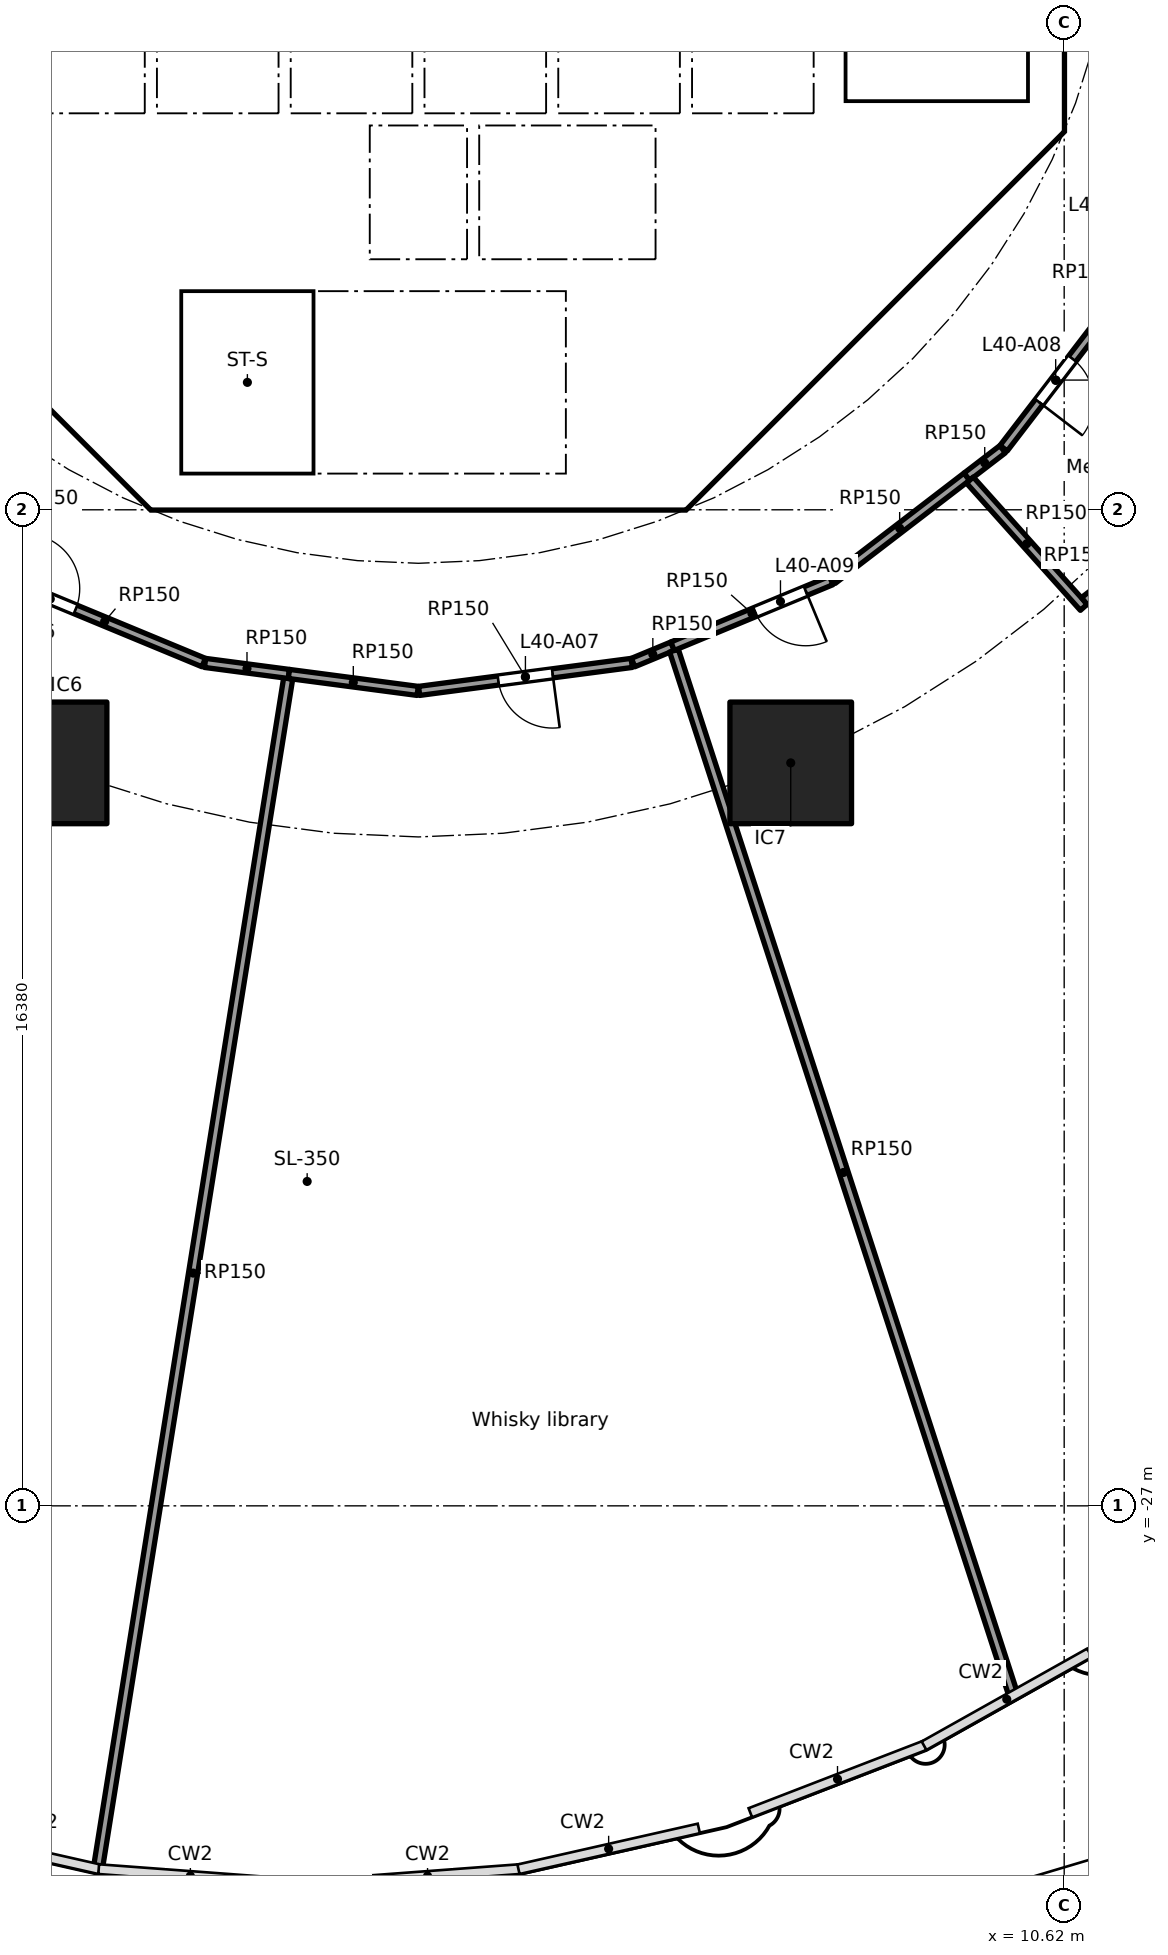
"""IFC4 building model, lengths in metres.
Left out: names, types, materials, properties, quantities, classifications, styles, units other than length and angle.
Written with IfcOpenShell. Run it as: python <this file> out.ifc"""

import sys

from ifc_helpers import new_model, si_unit, direction, frame, frame_2d, origin, origin_2d, place, context, subcontext, project, spatial, polyline, rectangle, outline, extrude, element, fill, save


model = new_model("IFC4")
c1 = context("Model", 3, precision=1e-05, world=origin(), true_north=direction((0.0, 1.0)))
c2 = subcontext(c1, "Body", "Model", "MODEL_VIEW")
j1 = project(units=[si_unit("LENGTHUNIT", "METRE"), si_unit("PLANEANGLEUNIT", "RADIAN")], contexts=[c1])
p1 = place(None, origin())
s1 = spatial("IfcSite", under=j1, at=p1, CompositionType="ELEMENT")
p2 = place(p1, origin())
s2 = spatial("IfcBuilding", under=s1, at=p2, CompositionType="ELEMENT")
p3 = place(p2, frame((0.0, 0.0, 160.3)))
s3 = spatial("IfcBuildingStorey", under=s2, at=p3, CompositionType="ELEMENT", Elevation=160.3)
for number, where, z_axis, x_axis in (
    (1, (-6.123, -14.782, 0.0), (0.0, 0.0, 1.0), (1.0, 0.0, 0.0)),
    (2, (6.123, -14.782, 0.0), (0.0, 0.0, 1.0), (1.0, 0.0, 0.0)),
):
    element("IfcColumn", number, at=place(p3, frame(where, z_axis=z_axis, x_axis=x_axis)), inside=s3, PredefinedType="COLUMN", context=c2, shape_type="SweptSolid", body=[
        extrude(rectangle(XDim=2.0, YDim=2.0, at=origin_2d()), origin(), (0.0, 0.0, 1.0), 5.6),
    ])
p4 = place(p3, frame((-9.988, -4.613, 0.0), z_axis=(0.0, 0.0, 1.0), x_axis=(0.707106781187, -0.707106781187, 0.0)))
e3 = element("IfcWall", 3, at=p4, inside=s3, PredefinedType="SHEAR", context=c2, shape_type="SweptSolid", body=[
    extrude(rectangle(XDim=7.602, YDim=0.6, at=frame_2d((3.801, 0.0))), origin(), (0.0, 0.0, 1.0), 5.34),
])
p5 = place(p4, frame((6.151, 0.0, 0.0)))
e4 = element("IfcOpeningElement", 4, at=p5, cuts=e3, PredefinedType="OPENING", context=c2, shape_type="SweptSolid", body=[
    extrude(rectangle(XDim=1.1, YDim=2.1, at=frame_2d((0.55, 1.05))), frame((0.0, 0.31, 0.0), z_axis=(0.0, -1.0, 0.0), x_axis=(1.0, 0.0, 0.0)), (0.0, 0.0, 1.0), 0.62),
])
p6 = place(p3, frame((4.613, -9.988, 0.0), z_axis=(0.0, 0.0, 1.0), x_axis=(0.707106781187, 0.707106781187, 0.0)))
e5 = element("IfcWall", 5, at=p6, inside=s3, PredefinedType="SHEAR", context=c2, shape_type="SweptSolid", body=[
    extrude(rectangle(XDim=7.602, YDim=0.6, at=frame_2d((3.801, 0.0))), origin(), (0.0, 0.0, 1.0), 5.34),
])
p7 = place(p6, frame((3.201, 0.0, 0.0)))
e6 = element("IfcOpeningElement", 6, at=p7, cuts=e5, PredefinedType="OPENING", context=c2, shape_type="SweptSolid", body=[
    extrude(rectangle(XDim=1.2, YDim=2.1, at=frame_2d((0.6, 1.05))), frame((0.0, 0.31, 0.0), z_axis=(0.0, -1.0, 0.0), x_axis=(1.0, 0.0, 0.0)), (0.0, 0.0, 1.0), 0.62),
])
p8 = place(p3, frame((4.0, -10.025, 0.0), z_axis=(0.0, 0.0, 1.0), x_axis=(0.0, 1.0, 0.0)))
e7 = element("IfcWall", 7, at=p8, inside=s3, PredefinedType="SOLIDWALL", context=c2, shape_type="SweptSolid", body=[
    extrude(rectangle(XDim=3.0, YDim=0.2, at=frame_2d((1.5, 0.0))), origin(), (0.0, 0.0, 1.0), 5.34),
])
p9 = place(p8, frame((0.975, 0.0, 0.0)))
e8 = element("IfcOpeningElement", 8, at=p9, cuts=e7, PredefinedType="OPENING", context=c2, shape_type="SweptSolid", body=[
    extrude(rectangle(XDim=1.1, YDim=2.1, at=frame_2d((0.55, 1.05))), frame((0.0, 0.11, 0.0), z_axis=(0.0, -1.0, 0.0), x_axis=(1.0, 0.0, 0.0)), (0.0, 0.0, 1.0), 0.22),
])
p10 = place(p3, frame((-5.8, -8.227, 0.0), z_axis=(0.0, 0.0, 1.0), x_axis=(0.0, 1.0, 0.0)))
e9 = element("IfcWall", 9, at=p10, inside=s3, PredefinedType="PARTITIONING", context=c2, shape_type="SweptSolid", body=[
    extrude(rectangle(XDim=3.927, YDim=0.15, at=frame_2d((1.963, 0.0))), origin(), (0.0, 0.0, 1.0), 5.34),
])
p11 = place(p10, frame((2.764, 0.0, 0.0)))
e10 = element("IfcOpeningElement", 10, at=p11, cuts=e9, PredefinedType="OPENING", context=c2, shape_type="SweptSolid", body=[
    extrude(rectangle(XDim=0.9, YDim=2.1, at=frame_2d((0.45, 1.05))), frame((0.0, 0.085, 0.0), z_axis=(0.0, -1.0, 0.0), x_axis=(1.0, 0.0, 0.0)), (0.0, 0.0, 1.0), 0.17),
])
p12 = place(p10, frame((0.688, 0.0, 0.0)))
e11 = element("IfcOpeningElement", 11, at=p12, cuts=e9, PredefinedType="OPENING", context=c2, shape_type="SweptSolid", body=[
    extrude(rectangle(XDim=0.9, YDim=2.1, at=frame_2d((0.45, 1.05))), frame((0.0, 0.085, 0.0), z_axis=(0.0, -1.0, 0.0), x_axis=(1.0, 0.0, 0.0)), (0.0, 0.0, 1.0), 0.17),
])
p13 = place(p3, frame((4.0, -6.5, 0.0), z_axis=(0.0, 0.0, 1.0), x_axis=(0.0, 1.0, 0.0)))
e12 = element("IfcWall", 12, at=p13, inside=s3, PredefinedType="SOLIDWALL", context=c2, shape_type="SweptSolid", body=[
    extrude(rectangle(XDim=2.2, YDim=0.2, at=frame_2d((1.1, 0.0))), origin(), (0.0, 0.0, 1.0), 5.34),
])
p14 = place(p13, frame((0.55, 0.0, 0.0)))
e13 = element("IfcOpeningElement", 13, at=p14, cuts=e12, PredefinedType="OPENING", context=c2, shape_type="SweptSolid", body=[
    extrude(rectangle(XDim=1.1, YDim=2.1, at=frame_2d((0.55, 1.05))), frame((0.0, 0.11, 0.0), z_axis=(0.0, -1.0, 0.0), x_axis=(1.0, 0.0, 0.0)), (0.0, 0.0, 1.0), 0.22),
])
p15 = place(p3, frame((-4.0, -6.5, 0.0), z_axis=(0.0, 0.0, 1.0), x_axis=(0.0, 1.0, 0.0)))
e14 = element("IfcWall", 14, at=p15, inside=s3, PredefinedType="SOLIDWALL", context=c2, shape_type="SweptSolid", body=[
    extrude(rectangle(XDim=2.2, YDim=0.2, at=frame_2d((1.1, 0.0))), origin(), (0.0, 0.0, 1.0), 5.34),
])
p16 = place(p15, frame((0.65, 0.0, 0.0)))
e15 = element("IfcOpeningElement", 15, at=p16, cuts=e14, PredefinedType="OPENING", context=c2, shape_type="SweptSolid", body=[
    extrude(rectangle(XDim=0.9, YDim=2.1, at=frame_2d((0.45, 1.05))), frame((0.0, 0.11, 0.0), z_axis=(0.0, -1.0, 0.0), x_axis=(1.0, 0.0, 0.0)), (0.0, 0.0, 1.0), 0.22),
])
p17 = place(p3, origin())
e16 = element("IfcWall", 16, at=p17, inside=s3, PredefinedType="SHEAR", context=c2, shape_type="SweptSolid", body=[
    extrude(outline(polyline([(-4.152, -10.025), (4.152, -10.025), (4.401, -9.776), (4.825, -10.2), (4.401, -10.625), (-4.401, -10.625), (-4.825, -10.2), (-4.401, -9.776), (-4.152, -10.025)])), origin(), (0.0, 0.0, 1.0), 5.34),
])
p18 = place(p3, origin())
e17 = element("IfcWall", 17, at=p18, inside=s3, PredefinedType="SHEAR", context=c2, shape_type="SweptSolid", body=[
    extrude(outline(polyline([(9.776, -4.401), (10.025, -4.152), (10.025, -3.801), (10.025, 4.152), (9.776, 4.401), (10.2, 4.825), (10.625, 4.401), (10.625, -4.401), (10.2, -4.825), (9.776, -4.401)])), origin(), (0.0, 0.0, 1.0), 5.34),
])
for number, where, z_axis, x_axis in (
    (18, (-0.9, -6.5, 0.0), (0.0, 0.0, 1.0), (0.0, 1.0, 0.0)),
    (19, (0.9, -6.5, 0.0), (0.0, 0.0, 1.0), (0.0, 1.0, 0.0)),
):
    element("IfcWall", number, at=place(p3, frame(where, z_axis=z_axis, x_axis=x_axis)), inside=s3, PredefinedType="SOLIDWALL", context=c2, shape_type="SweptSolid", body=[
        extrude(rectangle(XDim=2.2, YDim=0.2, at=frame_2d((1.1, 0.0))), origin(), (0.0, 0.0, 1.0), 5.34),
    ])
p19 = place(p3, origin())
e20 = element("IfcWall", 20, at=p19, inside=s3, PredefinedType="SOLIDWALL", context=c2, shape_type="SweptSolid", body=[
    extrude(outline(polyline([(-6.7, -2.1), (-6.5, -2.1), (-6.5, -4.1), (-4.5, -4.1), (-4.5, -2.1), (-4.3, -2.1), (-4.3, -4.1), (-2.3, -4.1), (-2.3, -2.1), (-2.1, -2.1), (-2.1, -4.1), (-0.1, -4.1), (-0.1, -2.1), (0.1, -2.1), (0.1, -4.1), (2.1, -4.1), (2.1, -2.1), (2.3, -2.1), (2.3, -4.1), (4.3, -4.1), (4.3, -2.1), (4.5, -2.1), (4.5, -4.1), (6.5, -4.1), (6.5, -2.1), (6.7, -2.1), (6.7, -4.3), (-6.7, -4.3), (-6.7, -2.1)])), origin(), (0.0, 0.0, 1.0), 5.34),
])
p20 = place(p3, frame((-8.301, -5.8, 0.0), z_axis=(0.0, 0.0, 1.0), x_axis=(1.0, 0.0, 0.0)))
e21 = element("IfcWall", 21, at=p20, inside=s3, PredefinedType="PARTITIONING", context=c2, shape_type="SweptSolid", body=[
    extrude(rectangle(XDim=2.426, YDim=0.15, at=frame_2d((1.213, 0.0))), origin(), (0.0, 0.0, 1.0), 5.34),
])
p21 = place(p3, origin())
e22 = element("IfcWall", 22, at=p21, inside=s3, PredefinedType="SOLIDWALL", context=c2, shape_type="SweptSolid", body=[
    extrude(outline(polyline([(-3.9, -10.025), (-4.1, -10.025), (-4.1, -7.025), (-3.9, -7.025), (-3.9, -10.025)])), origin(), (0.0, 0.0, 1.0), 5.34),
])
p22 = place(p3, origin())
e23 = element("IfcWall", 23, at=p22, inside=s3, PredefinedType="SOLIDWALL", context=c2, shape_type="SweptSolid", body=[
    extrude(outline(polyline([(4.1, -7.025), (-4.1, -7.025), (-4.1, -6.5), (4.1, -6.5), (4.1, -7.025)])), origin(), (0.0, 0.0, 1.0), 5.34),
])
p23 = place(p3, origin())
e24 = element("IfcWall", 24, at=p23, inside=s3, PredefinedType="SOLIDWALL", context=c2, shape_type="SweptSolid", body=[
    extrude(outline(polyline([(7.025, -3.9), (6.7, -3.9), (6.7, 3.9), (7.025, 3.9), (7.025, -3.9)])), origin(), (0.0, 0.0, 1.0), 5.34),
])
p24 = place(p3, origin())
e25 = element("IfcWall", 25, at=p24, inside=s3, PredefinedType="SOLIDWALL", context=c2, shape_type="SweptSolid", body=[
    extrude(outline(polyline([(10.025, -4.1), (6.7, -4.1), (6.7, -3.9), (10.025, -3.9), (10.025, -4.1)])), origin(), (0.0, 0.0, 1.0), 5.34),
])
p25 = place(p3, frame((-3.531, -13.132, 0.0), z_axis=(0.0, 0.0, 1.0), x_axis=(-0.923881838111, 0.382677866108, 0.0)))
e26 = element("IfcWall", 26, at=p25, inside=s3, PredefinedType="PARTITIONING", context=c2, shape_type="SweptSolid", body=[
    extrude(rectangle(XDim=3.527, YDim=0.15, at=frame_2d((1.763, 0.0))), origin(), (0.0, 0.0, 1.0), 5.34),
])
p26 = place(p25, frame((2.281, 0.0, 0.0)))
e27 = element("IfcOpeningElement", 27, at=p26, cuts=e26, PredefinedType="OPENING", context=c2, shape_type="SweptSolid", body=[
    extrude(rectangle(XDim=0.9, YDim=2.1, at=frame_2d((0.45, 1.05))), frame((0.0, 0.085, 0.0), z_axis=(0.0, -1.0, 0.0), x_axis=(1.0, 0.0, 0.0)), (0.0, 0.0, 1.0), 0.17),
])
p27 = place(p3, frame((-2.142, -13.394, 0.0), z_axis=(0.0, 0.0, 1.0), x_axis=(-0.157896749687, -0.987455627579, 0.0)))
e28 = element("IfcWall", 28, at=p27, inside=s3, PredefinedType="PARTITIONING", context=c2, shape_type="SweptSolid", body=[
    extrude(rectangle(XDim=19.805, YDim=0.15, at=frame_2d((9.903, 0.0))), origin(), (0.0, 0.0, 1.0), 5.34),
])
p28 = place(p3, frame((-2.13, -13.32, 0.0), z_axis=(0.0, 0.0, 1.0), x_axis=(-0.991448914516, 0.130495401857, 0.0)))
e29 = element("IfcWall", 29, at=p28, inside=s3, PredefinedType="PARTITIONING", context=c2, shape_type="SweptSolid", body=[
    extrude(rectangle(XDim=1.39, YDim=0.15, at=frame_2d((0.695, 0.0))), origin(), (0.0, 0.0, 1.0), 5.34),
])
p29 = place(p3, frame((-0.012, -13.598, 0.0), z_axis=(0.0, 0.0, 1.0), x_axis=(-0.991448071145, 0.130501809272, 0.0)))
e30 = element("IfcWall", 30, at=p29, inside=s3, PredefinedType="PARTITIONING", context=c2, shape_type="SweptSolid", body=[
    extrude(rectangle(XDim=2.136, YDim=0.15, at=frame_2d((1.068, 0.0))), origin(), (0.0, 0.0, 1.0), 5.34),
])
p30 = place(p3, frame((3.508, -13.138, 0.0), z_axis=(0.0, 0.0, 1.0), x_axis=(-0.991448403586, -0.130499283623, 0.0)))
e31 = element("IfcWall", 31, at=p30, inside=s3, PredefinedType="PARTITIONING", context=c2, shape_type="SweptSolid", body=[
    extrude(rectangle(XDim=3.527, YDim=0.15, at=frame_2d((1.763, 0.0))), origin(), (0.0, 0.0, 1.0), 5.34),
])
p31 = place(p30, frame((1.313, 0.0, 0.0)))
e32 = element("IfcOpeningElement", 32, at=p31, cuts=e31, PredefinedType="OPENING", context=c2, shape_type="SweptSolid", body=[
    extrude(rectangle(XDim=0.9, YDim=2.1, at=frame_2d((0.45, 1.05))), frame((0.0, 0.085, 0.0), z_axis=(0.0, -1.0, 0.0), x_axis=(1.0, 0.0, 0.0)), (0.0, 0.0, 1.0), 0.17),
])
p32 = place(p3, frame((4.18, -12.863, 0.0), z_axis=(0.0, 0.0, 1.0), x_axis=(-0.923877031545, -0.382689470177, 0.0)))
e33 = element("IfcWall", 33, at=p32, inside=s3, PredefinedType="PARTITIONING", context=c2, shape_type="SweptSolid", body=[
    extrude(rectangle(XDim=0.702, YDim=0.15, at=frame_2d((0.351, 0.0))), origin(), (0.0, 0.0, 1.0), 5.34),
])
p33 = place(p3, frame((4.203, -12.935, 0.0), z_axis=(0.0, 0.0, 1.0), x_axis=(0.309019390558, -0.951055737725, 0.0)))
e34 = element("IfcWall", 34, at=p33, inside=s3, PredefinedType="PARTITIONING", context=c2, shape_type="SweptSolid", body=[
    extrude(rectangle(XDim=18.048, YDim=0.15, at=frame_2d((9.024, 0.0))), origin(), (0.0, 0.0, 1.0), 5.34),
])
p34 = place(p3, frame((6.789, -11.782, 0.0), z_axis=(0.0, 0.0, 1.0), x_axis=(-0.923883033442, -0.382674980262, 0.0)))
e35 = element("IfcWall", 35, at=p34, inside=s3, PredefinedType="PARTITIONING", context=c2, shape_type="SweptSolid", body=[
    extrude(rectangle(XDim=2.824, YDim=0.15, at=frame_2d((1.412, 0.0))), origin(), (0.0, 0.0, 1.0), 5.34),
])
p35 = place(p34, frame((0.454, 0.0, 0.0)))
e36 = element("IfcOpeningElement", 36, at=p35, cuts=e35, PredefinedType="OPENING", context=c2, shape_type="SweptSolid", body=[
    extrude(rectangle(XDim=0.9, YDim=2.1, at=frame_2d((0.45, 1.05))), frame((0.0, 0.085, 0.0), z_axis=(0.0, -1.0, 0.0), x_axis=(1.0, 0.0, 0.0)), (0.0, 0.0, 1.0), 0.17),
])
p36 = place(p3, frame((9.019, -10.075, 0.0), z_axis=(0.0, 0.0, 1.0), x_axis=(-0.793356581691, -0.608757204711, 0.0)))
e37 = element("IfcWall", 37, at=p36, inside=s3, PredefinedType="PARTITIONING", context=c2, shape_type="SweptSolid", body=[
    extrude(rectangle(XDim=2.785, YDim=0.15, at=frame_2d((1.393, 0.0))), origin(), (0.0, 0.0, 1.0), 5.34),
])
p37 = place(p3, frame((9.607, -9.624, 0.0), z_axis=(0.0, 0.0, 1.0), x_axis=(-0.793431391307, -0.608659697441, 0.0)))
e38 = element("IfcWall", 38, at=p37, inside=s3, PredefinedType="PARTITIONING", context=c2, shape_type="SweptSolid", body=[
    extrude(rectangle(XDim=0.741, YDim=0.15, at=frame_2d((0.371, 0.0))), origin(), (0.0, 0.0, 1.0), 5.34),
])
p38 = place(p3, frame((10.942, -12.224, 0.0), z_axis=(0.0, 0.0, 1.0), x_axis=(-0.666993055926, 0.745063932389, 0.0)))
e39 = element("IfcWall", 39, at=p38, inside=s3, PredefinedType="PARTITIONING", context=c2, shape_type="SweptSolid", body=[
    extrude(rectangle(XDim=2.808, YDim=0.15, at=frame_2d((1.404, 0.0))), origin(), (0.0, 0.0, 1.0), 5.34),
])
p39 = place(p3, frame((11.343, -7.366, 0.0), z_axis=(0.0, 0.0, 1.0), x_axis=(-0.608732750311, -0.793375345407, 0.0)))
e40 = element("IfcWall", 40, at=p39, inside=s3, PredefinedType="PARTITIONING", context=c2, shape_type="SweptSolid", body=[
    extrude(rectangle(XDim=2.824, YDim=0.15, at=frame_2d((1.412, 0.0))), origin(), (0.0, 0.0, 1.0), 5.34),
])
p40 = place(p39, frame((0.968, 0.0, 0.0)))
e41 = element("IfcOpeningElement", 41, at=p40, cuts=e40, PredefinedType="OPENING", context=c2, shape_type="SweptSolid", body=[
    extrude(rectangle(XDim=0.9, YDim=2.1, at=frame_2d((0.45, 1.05))), frame((0.0, 0.085, 0.0), z_axis=(0.0, -1.0, 0.0), x_axis=(1.0, 0.0, 0.0)), (0.0, 0.0, 1.0), 0.17),
])
p41 = place(p3, frame((11.604, -11.621, 0.0), z_axis=(0.0, 0.0, 1.0), x_axis=(-0.793219322038, -0.608936045201, 0.0)))
e42 = element("IfcWall", 42, at=p41, inside=s3, PredefinedType="PARTITIONING", context=c2, shape_type="SweptSolid", body=[
    extrude(rectangle(XDim=0.823, YDim=0.15, at=frame_2d((0.411, 0.0))), origin(), (0.0, 0.0, 1.0), 5.34),
])
p42 = place(p14, origin())
e43 = element("IfcDoor", 43, at=p42, inside=s3, OperationType="DOUBLE_DOOR_SLIDING", PredefinedType="DOOR", context=c2, shape_type="SweptSolid", body=[
    extrude(rectangle(XDim=1.1, YDim=2.1, at=frame_2d((0.55, 1.05))), frame((0.0, 0.025, 0.0), z_axis=(0.0, -1.0, 0.0), x_axis=(1.0, 0.0, 0.0)), (0.0, 0.0, 1.0), 0.05),
])
fill(e13, e43)
p43 = place(p9, origin())
e44 = element("IfcDoor", 44, at=p43, inside=s3, OperationType="SINGLE_SWING_LEFT", PredefinedType="DOOR", context=c2, shape_type="SweptSolid", body=[
    extrude(rectangle(XDim=1.1, YDim=2.1, at=frame_2d((0.55, 1.05))), frame((0.0, 0.025, 0.0), z_axis=(0.0, -1.0, 0.0), x_axis=(1.0, 0.0, 0.0)), (0.0, 0.0, 1.0), 0.05),
])
fill(e8, e44)
p44 = place(p11, origin())
e45 = element("IfcDoor", 45, at=p44, inside=s3, OperationType="SINGLE_SWING_LEFT", PredefinedType="DOOR", context=c2, shape_type="SweptSolid", body=[
    extrude(rectangle(XDim=0.9, YDim=2.1, at=frame_2d((0.45, 1.05))), frame((0.0, 0.025, 0.0), z_axis=(0.0, -1.0, 0.0), x_axis=(1.0, 0.0, 0.0)), (0.0, 0.0, 1.0), 0.05),
])
fill(e10, e45)
p45 = place(p12, origin())
e46 = element("IfcDoor", 46, at=p45, inside=s3, OperationType="SINGLE_SWING_LEFT", PredefinedType="DOOR", context=c2, shape_type="SweptSolid", body=[
    extrude(rectangle(XDim=0.9, YDim=2.1, at=frame_2d((0.45, 1.05))), frame((0.0, 0.025, 0.0), z_axis=(0.0, -1.0, 0.0), x_axis=(1.0, 0.0, 0.0)), (0.0, 0.0, 1.0), 0.05),
])
fill(e11, e46)
p46 = place(p16, frame((0.9, 0.0, 0.0), x_axis=(-1.0, 0.0, 0.0)))
e47 = element("IfcDoor", 47, at=p46, inside=s3, OperationType="SINGLE_SWING_RIGHT", PredefinedType="DOOR", context=c2, shape_type="SweptSolid", body=[
    extrude(rectangle(XDim=0.9, YDim=2.1, at=frame_2d((0.45, 1.05))), frame((0.0, 0.025, 0.0), z_axis=(0.0, -1.0, 0.0), x_axis=(1.0, 0.0, 0.0)), (0.0, 0.0, 1.0), 0.05),
])
fill(e15, e47)
p47 = place(p7, origin())
e48 = element("IfcDoor", 48, at=p47, inside=s3, OperationType="SINGLE_SWING_LEFT", PredefinedType="DOOR", context=c2, shape_type="SweptSolid", body=[
    extrude(rectangle(XDim=1.2, YDim=2.1, at=frame_2d((0.6, 1.05))), frame((0.0, 0.025, 0.0), z_axis=(0.0, -1.0, 0.0), x_axis=(1.0, 0.0, 0.0)), (0.0, 0.0, 1.0), 0.05),
])
fill(e6, e48)
p48 = place(p5, origin())
e49 = element("IfcDoor", 49, at=p48, inside=s3, OperationType="SINGLE_SWING_LEFT", PredefinedType="DOOR", context=c2, shape_type="SweptSolid", body=[
    extrude(rectangle(XDim=1.1, YDim=2.1, at=frame_2d((0.55, 1.05))), frame((0.0, 0.025, 0.0), z_axis=(0.0, -1.0, 0.0), x_axis=(1.0, 0.0, 0.0)), (0.0, 0.0, 1.0), 0.05),
])
fill(e4, e49)
p49 = place(p26, frame((0.9, 0.0, 0.0), x_axis=(-1.0, 0.0, 0.0)))
e50 = element("IfcDoor", 50, at=p49, inside=s3, OperationType="SINGLE_SWING_LEFT", PredefinedType="DOOR", context=c2, shape_type="SweptSolid", body=[
    extrude(rectangle(XDim=0.9, YDim=2.1, at=frame_2d((0.45, 1.05))), frame((0.0, 0.025, 0.0), z_axis=(0.0, -1.0, 0.0), x_axis=(1.0, 0.0, 0.0)), (0.0, 0.0, 1.0), 0.05),
])
fill(e27, e50)
p50 = place(p31, origin())
e51 = element("IfcDoor", 51, at=p50, inside=s3, OperationType="SINGLE_SWING_LEFT", PredefinedType="DOOR", context=c2, shape_type="SweptSolid", body=[
    extrude(rectangle(XDim=0.9, YDim=2.1, at=frame_2d((0.45, 1.05))), frame((0.0, 0.025, 0.0), z_axis=(0.0, -1.0, 0.0), x_axis=(1.0, 0.0, 0.0)), (0.0, 0.0, 1.0), 0.05),
])
fill(e32, e51)
p51 = place(p40, origin())
e52 = element("IfcDoor", 52, at=p51, inside=s3, OperationType="SINGLE_SWING_RIGHT", PredefinedType="DOOR", context=c2, shape_type="SweptSolid", body=[
    extrude(rectangle(XDim=0.9, YDim=2.1, at=frame_2d((0.45, 1.05))), frame((0.0, 0.025, 0.0), z_axis=(0.0, -1.0, 0.0), x_axis=(1.0, 0.0, 0.0)), (0.0, 0.0, 1.0), 0.05),
])
fill(e41, e52)
p52 = place(p35, origin())
e53 = element("IfcDoor", 53, at=p52, inside=s3, OperationType="SINGLE_SWING_LEFT", PredefinedType="DOOR", context=c2, shape_type="SweptSolid", body=[
    extrude(rectangle(XDim=0.9, YDim=2.1, at=frame_2d((0.45, 1.05))), frame((0.0, 0.025, 0.0), z_axis=(0.0, -1.0, 0.0), x_axis=(1.0, 0.0, 0.0)), (0.0, 0.0, 1.0), 0.05),
])
fill(e36, e53)
save(model, sys.argv[1])
